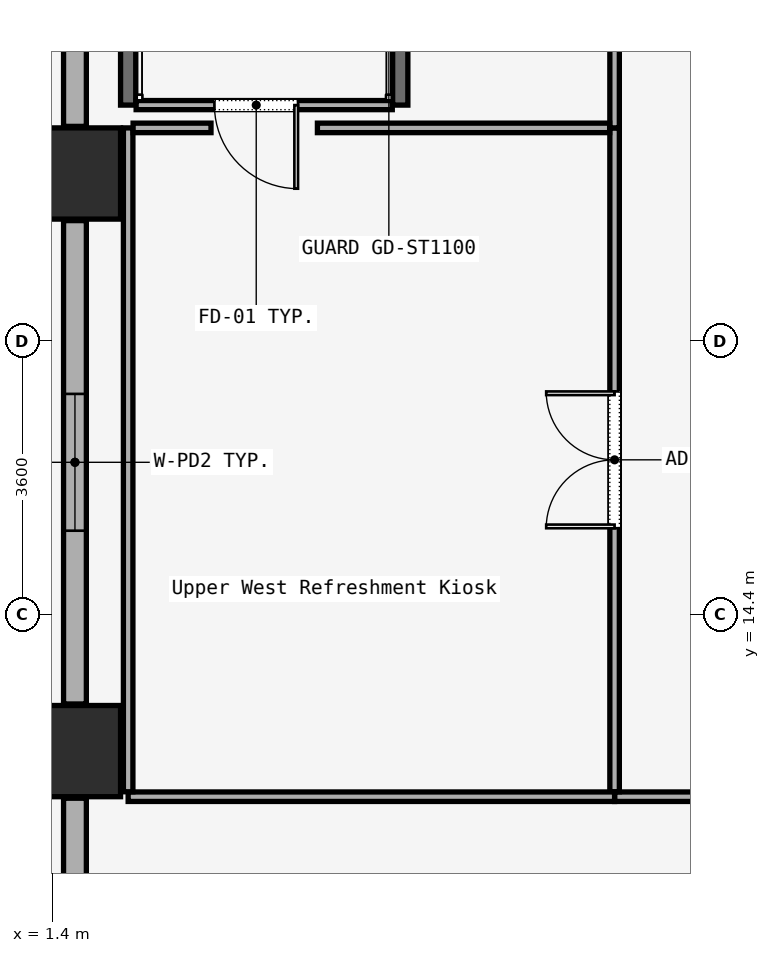
"""IFC4 building model, lengths in metres.
Left out: names, types, materials, properties, quantities, classifications, styles, units other than length and angle.
Written with IfcOpenShell. Run it as: python <this file> out.ifc"""

import sys

from ifc_helpers import new_model, si_unit, direction, frame, frame_2d, origin, origin_2d, place, context, subcontext, project, spatial, rectangle, extrude, element, fill, save


model = new_model("IFC4")
c1 = context("Model", 3, precision=1e-05, world=origin(), true_north=direction((0.0, 1.0)))
c2 = subcontext(c1, "Body", "Model", "MODEL_VIEW")
j1 = project(units=[si_unit("LENGTHUNIT", "METRE"), si_unit("PLANEANGLEUNIT", "RADIAN")], contexts=[c1])
p1 = place(None, origin())
s1 = spatial("IfcSite", under=j1, at=p1, CompositionType="ELEMENT")
p2 = place(p1, origin())
s2 = spatial("IfcBuilding", under=s1, at=p2, CompositionType="ELEMENT")
p3 = place(p2, frame((0.0, 0.0, 18.0)))
s3 = spatial("IfcBuildingStorey", under=s2, at=p3, CompositionType="ELEMENT", Elevation=18.0)
for number, where, z_axis, x_axis in (
    (1, (1.7, 12.6, 0.0), (0.0, 0.0, 1.0), (1.0, 0.0, 0.0)),
    (2, (1.7, 20.2, 0.0), (0.0, 0.0, 1.0), (1.0, 0.0, 0.0)),
):
    element("IfcColumn", number, at=place(p3, frame(where, z_axis=z_axis, x_axis=x_axis)), inside=s3, PredefinedType="COLUMN", context=c2, shape_type="SweptSolid", body=[
        extrude(rectangle(XDim=1.2, YDim=1.2, at=origin_2d()), origin(), (0.0, 0.0, 1.0), 5.7),
    ])
p4 = place(p3, frame((1.7, 5.62, 0.0), z_axis=(0.0, 0.0, 1.0), x_axis=(0.0, 1.0, 0.0)))
e3 = element("IfcWall", 3, at=p4, inside=s3, PredefinedType="SOLIDWALL", context=c2, shape_type="SweptSolid", body=[
    extrude(rectangle(XDim=6.36, YDim=0.3, at=frame_2d((3.18, 0.0))), origin(), (0.0, 0.0, 1.0), 5.7),
])
p5 = place(p4, frame((2.28, 0.0, 1.0)))
e4 = element("IfcOpeningElement", 4, at=p5, cuts=e3, PredefinedType="OPENING", context=c2, shape_type="SweptSolid", body=[
    extrude(rectangle(XDim=1.8, YDim=2.2, at=frame_2d((0.9, 1.1))), frame((0.0, 0.15, 0.0), z_axis=(0.0, -1.0, 0.0), x_axis=(1.0, 0.0, 0.0)), (0.0, 0.0, 1.0), 0.3),
])
p6 = place(p3, frame((1.7, 13.22, 0.0), z_axis=(0.0, 0.0, 1.0), x_axis=(0.0, 1.0, 0.0)))
e5 = element("IfcWall", 5, at=p6, inside=s3, PredefinedType="SOLIDWALL", context=c2, shape_type="SweptSolid", body=[
    extrude(rectangle(XDim=6.36, YDim=0.3, at=frame_2d((3.18, 0.0))), origin(), (0.0, 0.0, 1.0), 5.7),
])
p7 = place(p6, frame((2.28, 0.0, 1.0)))
e6 = element("IfcOpeningElement", 6, at=p7, cuts=e5, PredefinedType="OPENING", context=c2, shape_type="SweptSolid", body=[
    extrude(rectangle(XDim=1.8, YDim=2.2, at=frame_2d((0.9, 1.1))), frame((0.0, 0.15, 0.0), z_axis=(0.0, -1.0, 0.0), x_axis=(1.0, 0.0, 0.0)), (0.0, 0.0, 1.0), 0.3),
])
p8 = place(p3, frame((1.7, 20.82, 0.0), z_axis=(0.0, 0.0, 1.0), x_axis=(0.0, 1.0, 0.0)))
e7 = element("IfcWall", 7, at=p8, inside=s3, PredefinedType="SOLIDWALL", context=c2, shape_type="SweptSolid", body=[
    extrude(rectangle(XDim=6.36, YDim=0.3, at=frame_2d((3.18, 0.0))), origin(), (0.0, 0.0, 1.0), 5.7),
])
p9 = place(p8, frame((2.28, 0.0, 1.0)))
e8 = element("IfcOpeningElement", 8, at=p9, cuts=e7, PredefinedType="OPENING", context=c2, shape_type="SweptSolid", body=[
    extrude(rectangle(XDim=1.8, YDim=2.2, at=frame_2d((0.9, 1.1))), frame((0.0, 0.15, 0.0), z_axis=(0.0, -1.0, 0.0), x_axis=(1.0, 0.0, 0.0)), (0.0, 0.0, 1.0), 0.3),
])
for number, where, z_axis, x_axis in (
    (9, (5.98, 21.1, 0.0), (0.0, 0.0, 1.0), (0.0, 1.0, 0.0)),
    (10, (2.4, 21.1, 0.0), (0.0, 0.0, 1.0), (0.0, 1.0, 0.0)),
):
    element("IfcWall", number, at=place(p3, frame(where, z_axis=z_axis, x_axis=x_axis)), inside=s3, PredefinedType="SOLIDWALL", context=c2, shape_type="SweptSolid", body=[
        extrude(rectangle(XDim=7.95, YDim=0.2, at=frame_2d((3.975, 0.0))), origin(), (0.0, 0.0, 1.0), 6.0),
    ])
p10 = place(p3, frame((5.875, 21.1, 0.0), z_axis=(0.0, 0.0, 1.0), x_axis=(-1.0, 0.0, 0.0)))
e11 = element("IfcWall", 11, at=p10, inside=s3, PredefinedType="SOLIDWALL", context=c2, shape_type="SweptSolid", body=[
    extrude(rectangle(XDim=3.37, YDim=0.12, at=frame_2d((1.685, 0.0))), origin(), (0.0, 0.0, 1.0), 4.47),
])
p11 = place(p10, frame((1.24, 0.0, 0.0)))
e12 = element("IfcOpeningElement", 12, at=p11, cuts=e11, PredefinedType="OPENING", context=c2, shape_type="SweptSolid", body=[
    extrude(rectangle(XDim=1.1, YDim=2.2, at=frame_2d((0.55, 1.1))), frame((0.0, 0.06, 0.0), z_axis=(0.0, -1.0, 0.0), x_axis=(1.0, 0.0, 0.0)), (0.0, 0.0, 1.0), 0.12),
])
p12 = place(p3, frame((14.435, 12.0, 0.0), z_axis=(0.0, 0.0, 1.0), x_axis=(-1.0, 0.0, 0.0)))
e13 = element("IfcWall", 13, at=p12, inside=s3, PredefinedType="PARTITIONING", context=c2, shape_type="SweptSolid", body=[
    extrude(rectangle(XDim=5.635, YDim=0.125, at=frame_2d((2.817, 0.0))), origin(), (0.0, 0.0, 1.0), 4.47),
])
p13 = place(p3, frame((8.8, 12.065, 0.0), z_axis=(0.0, 0.0, 1.0), x_axis=(0.0, 1.0, 0.0)))
e14 = element("IfcWall", 14, at=p13, inside=s3, PredefinedType="PARTITIONING", context=c2, shape_type="SweptSolid", body=[
    extrude(rectangle(XDim=8.735, YDim=0.125, at=frame_2d((4.368, 0.0))), origin(), (0.0, 0.0, 1.0), 4.47),
])
p14 = place(p13, frame((3.468, 0.0, 0.0)))
e15 = element("IfcOpeningElement", 15, at=p14, cuts=e14, PredefinedType="OPENING", context=c2, shape_type="SweptSolid", body=[
    extrude(rectangle(XDim=1.8, YDim=2.3, at=frame_2d((0.9, 1.15))), frame((0.0, 0.062, 0.0), z_axis=(0.0, -1.0, 0.0), x_axis=(1.0, 0.0, 0.0)), (0.0, 0.0, 1.0), 0.125),
])
p15 = place(p3, frame((8.8, 20.8, 0.0), z_axis=(0.0, 0.0, 1.0), x_axis=(0.0, 1.0, 0.0)))
e16 = element("IfcWall", 16, at=p15, inside=s3, PredefinedType="PARTITIONING", context=c2, shape_type="SweptSolid", body=[
    extrude(rectangle(XDim=22.85, YDim=0.125, at=frame_2d((11.425, 0.0))), origin(), (0.0, 0.0, 1.0), 4.47),
])
p16 = place(p3, frame((8.8, 12.0, 0.0), z_axis=(0.0, 0.0, 1.0), x_axis=(-1.0, 0.0, 0.0)))
e17 = element("IfcWall", 17, at=p16, inside=s3, PredefinedType="PARTITIONING", context=c2, shape_type="SweptSolid", body=[
    extrude(rectangle(XDim=6.4, YDim=0.125, at=frame_2d((3.2, 0.0))), origin(), (0.0, 0.0, 1.0), 4.47),
])
p17 = place(p3, frame((2.4, 12.065, 0.0), z_axis=(0.0, 0.0, 1.0), x_axis=(0.0, 1.0, 0.0)))
e18 = element("IfcWall", 18, at=p17, inside=s3, PredefinedType="PARTITIONING", context=c2, shape_type="SweptSolid", body=[
    extrude(rectangle(XDim=8.735, YDim=0.125, at=frame_2d((4.368, 0.0))), origin(), (0.0, 0.0, 1.0), 4.47),
])
p18 = place(p3, frame((2.465, 20.8, 0.0), z_axis=(0.0, 0.0, 1.0), x_axis=(1.0, 0.0, 0.0)))
e19 = element("IfcWall", 19, at=p18, inside=s3, PredefinedType="PARTITIONING", context=c2, shape_type="SweptSolid", body=[
    extrude(rectangle(XDim=1.025, YDim=0.125, at=frame_2d((0.512, 0.0))), origin(), (0.0, 0.0, 1.0), 4.47),
])
p19 = place(p3, frame((4.89, 20.8, 0.0), z_axis=(0.0, 0.0, 1.0), x_axis=(1.0, 0.0, 0.0)))
e20 = element("IfcWall", 20, at=p19, inside=s3, PredefinedType="PARTITIONING", context=c2, shape_type="SweptSolid", body=[
    extrude(rectangle(XDim=3.845, YDim=0.125, at=frame_2d((1.923, 0.0))), origin(), (0.0, 0.0, 1.0), 4.47),
])
p20 = place(p7, origin())
e21 = element("IfcWindow", 21, at=p20, inside=s3, PartitioningType="SINGLE_PANEL", PredefinedType="WINDOW", context=c2, shape_type="SweptSolid", body=[
    extrude(rectangle(XDim=1.8, YDim=2.2, at=frame_2d((0.9, 1.1))), frame((0.0, 0.03, 0.0), z_axis=(0.0, -1.0, 0.0), x_axis=(1.0, 0.0, 0.0)), (0.0, 0.0, 1.0), 0.06),
])
fill(e6, e21)
p21 = place(p11, origin())
e22 = element("IfcDoor", 22, at=p21, inside=s3, OperationType="SINGLE_SWING_RIGHT", PredefinedType="DOOR", context=c2, shape_type="SweptSolid", body=[
    extrude(rectangle(XDim=1.1, YDim=2.2, at=frame_2d((0.55, 1.1))), frame((0.0, 0.025, 0.0), z_axis=(0.0, -1.0, 0.0), x_axis=(1.0, 0.0, 0.0)), (0.0, 0.0, 1.0), 0.05),
])
fill(e12, e22)
p22 = place(p14, origin())
e23 = element("IfcDoor", 23, at=p22, inside=s3, OperationType="SINGLE_SWING_RIGHT", PredefinedType="DOOR", context=c2, shape_type="SweptSolid", body=[
    extrude(rectangle(XDim=1.8, YDim=2.3, at=frame_2d((0.9, 1.15))), frame((0.0, 0.025, 0.0), z_axis=(0.0, -1.0, 0.0), x_axis=(1.0, 0.0, 0.0)), (0.0, 0.0, 1.0), 0.05),
])
fill(e15, e23)
save(model, sys.argv[1])
